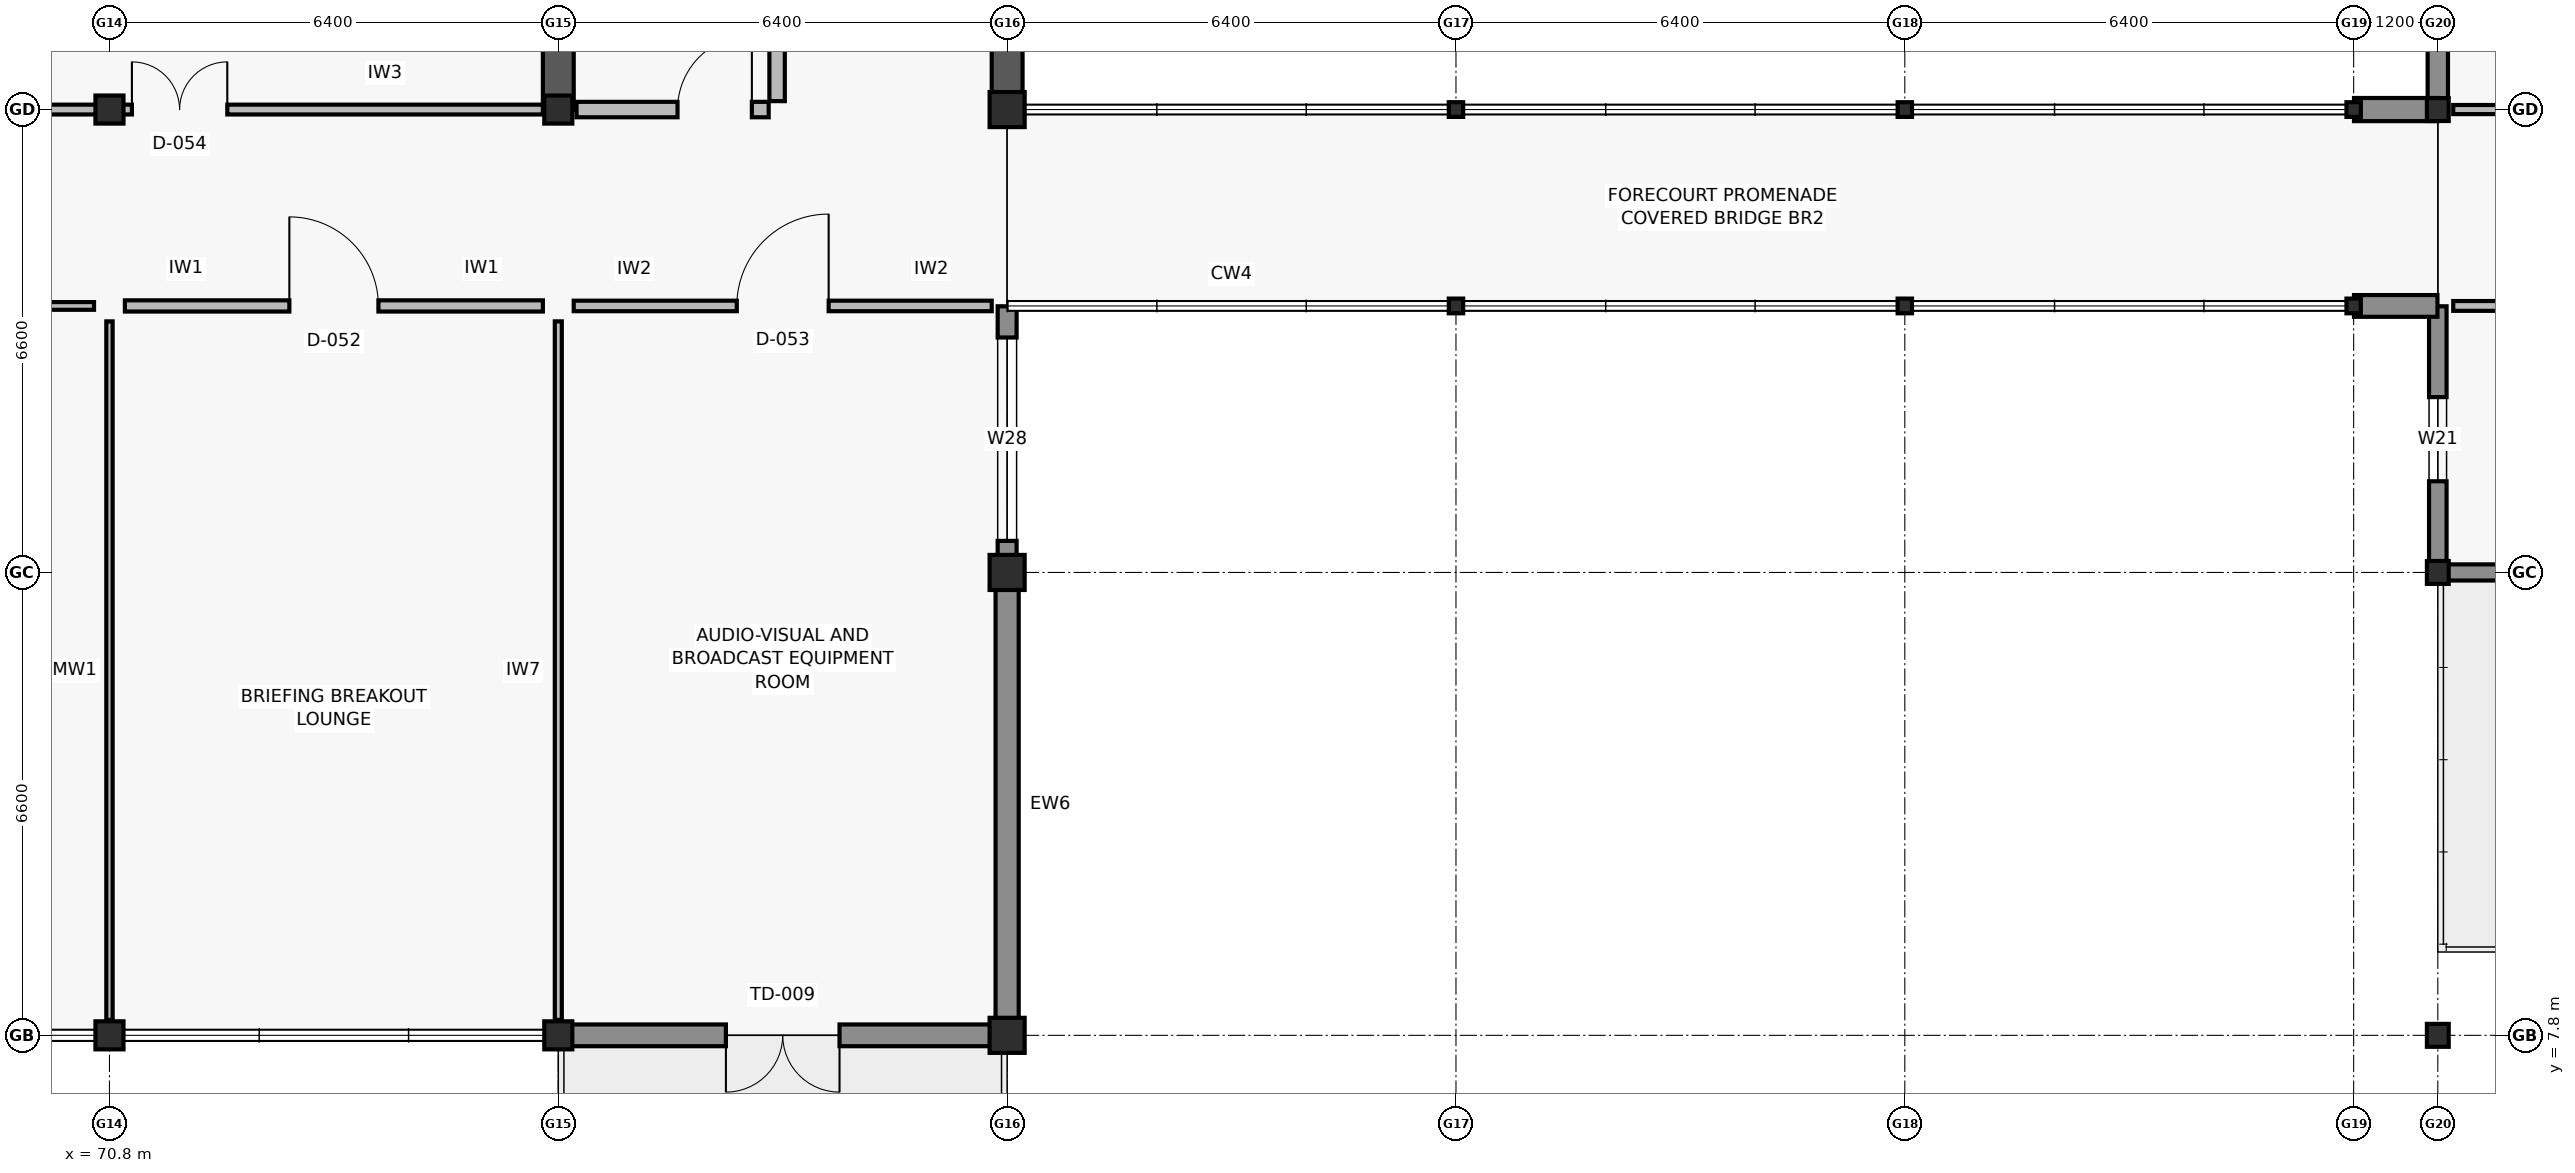
"""IFC4 building model, lengths in metres.
Left out: names, types, materials, properties, quantities, classifications, styles, units other than length and angle.
Written with IfcOpenShell. Run it as: python <this file> out.ifc"""

import sys

from ifc_helpers import new_model, si_unit, direction, frame, frame_2d, origin, origin_2d, place, context, subcontext, project, spatial, rectangle, i_section, extrude, element, fill, save


model = new_model("IFC4")
c1 = context("Model", 3, precision=1e-05, world=origin(), true_north=direction((0.0, 1.0)))
c2 = subcontext(c1, "Body", "Model", "MODEL_VIEW")
j1 = project(units=[si_unit("LENGTHUNIT", "METRE"), si_unit("PLANEANGLEUNIT", "RADIAN")], contexts=[c1])
p1 = place(None, origin())
s1 = spatial("IfcSite", under=j1, at=p1, CompositionType="ELEMENT")
p2 = place(p1, origin())
s2 = spatial("IfcBuilding", under=s1, at=p2, CompositionType="ELEMENT")
p3 = place(p2, frame((0.0, 0.0, 5.4)))
s3 = spatial("IfcBuildingStorey", under=s2, at=p3, CompositionType="ELEMENT", Elevation=5.4)
for number, where, z_axis, x_axis in (
    (1, (70.8, 7.8, 0.0), (0.0, 0.0, 1.0), (1.0, 0.0, 0.0)),
    (2, (70.8, 21.0, 0.0), (0.0, 0.0, 1.0), (1.0, 0.0, 0.0)),
    (3, (77.2, 7.8, 0.0), (0.0, 0.0, 1.0), (1.0, 0.0, 0.0)),
    (4, (77.2, 21.0, 0.0), (0.0, 0.0, 1.0), (1.0, 0.0, 0.0)),
):
    element("IfcColumn", number, at=place(p3, frame(where, z_axis=z_axis, x_axis=x_axis)), inside=s3, PredefinedType="COLUMN", context=c2, shape_type="SweptSolid", body=[
        extrude(i_section(OverallWidth=0.4, OverallDepth=0.4, WebThickness=0.02, FlangeThickness=0.032, at=origin_2d()), origin(), (0.0, 0.0, 1.0), 4.2),
    ])
for number, where, z_axis, x_axis in (
    (5, (83.6, 7.8, 0.0), (0.0, 0.0, 1.0), (1.0, 0.0, 0.0)),
    (6, (83.6, 14.4, 0.0), (0.0, 0.0, 1.0), (1.0, 0.0, 0.0)),
    (7, (83.6, 21.0, 0.0), (0.0, 0.0, 1.0), (1.0, 0.0, 0.0)),
):
    element("IfcColumn", number, at=place(p3, frame(where, z_axis=z_axis, x_axis=x_axis)), inside=s3, PredefinedType="COLUMN", context=c2, shape_type="SweptSolid", body=[
        extrude(i_section(OverallWidth=0.5, OverallDepth=0.5, WebThickness=0.02, FlangeThickness=0.036, at=origin_2d()), origin(), (0.0, 0.0, 1.0), 4.2),
    ])
for number, where, z_axis, x_axis in (
    (8, (90.0, 18.2, 0.0), (0.0, 0.0, 1.0), (1.0, 0.0, 0.0)),
    (9, (90.0, 21.0, 0.0), (0.0, 0.0, 1.0), (1.0, 0.0, 0.0)),
    (10, (96.4, 18.2, 0.0), (0.0, 0.0, 1.0), (1.0, 0.0, 0.0)),
    (11, (96.4, 21.0, 0.0), (0.0, 0.0, 1.0), (1.0, 0.0, 0.0)),
    (12, (102.8, 18.2, 0.0), (0.0, 0.0, 1.0), (1.0, 0.0, 0.0)),
    (13, (102.8, 21.0, 0.0), (0.0, 0.0, 1.0), (1.0, 0.0, 0.0)),
):
    element("IfcColumn", number, at=place(p3, frame(where, z_axis=z_axis, x_axis=x_axis)), inside=s3, PredefinedType="COLUMN", context=c2, shape_type="SweptSolid", body=[
        extrude(i_section(OverallWidth=0.205, OverallDepth=0.21, WebThickness=0.009, FlangeThickness=0.014, FilletRadius=0.011, at=origin_2d()), origin(), (0.0, 0.0, 1.0), 4.2),
    ])
for number, where, z_axis, x_axis in (
    (14, (104.0, 7.8, 0.0), (0.0, 0.0, 1.0), (1.0, 0.0, 0.0)),
    (15, (104.0, 14.4, 0.0), (0.0, 0.0, 1.0), (1.0, 0.0, 0.0)),
    (16, (104.0, 21.0, 0.0), (0.0, 0.0, 1.0), (1.0, 0.0, 0.0)),
):
    element("IfcColumn", number, at=place(p3, frame(where, z_axis=z_axis, x_axis=x_axis)), inside=s3, PredefinedType="COLUMN", context=c2, shape_type="SweptSolid", body=[
        extrude(i_section(OverallWidth=0.311, OverallDepth=0.327, WebThickness=0.016, FlangeThickness=0.025, FilletRadius=0.017, at=origin_2d()), origin(), (0.0, 0.0, 1.0), 4.2),
    ])
for number, where, z_axis, x_axis in (
    (17, (77.2, 21.0, 0.0), (0.0, 0.0, 1.0), (0.0, 1.0, 0.0)),
    (18, (83.6, 21.0, 0.0), (0.0, 0.0, 1.0), (0.0, 1.0, 0.0)),
):
    element("IfcWall", number, at=place(p3, frame(where, z_axis=z_axis, x_axis=x_axis)), inside=s3, PredefinedType="SHEAR", context=c2, shape_type="SweptSolid", body=[
        extrude(rectangle(XDim=6.38, YDim=0.44, at=frame_2d((3.19, 0.0))), origin(), (0.0, 0.0, 1.0), 3.96),
    ])
p4 = place(p3, frame((83.595, 7.8, 0.0), z_axis=(0.0, 0.0, 1.0), x_axis=(-1.0, 0.0, 0.0)))
e19 = element("IfcWall", 19, at=p4, inside=s3, PredefinedType="SOLIDWALL", context=c2, shape_type="SweptSolid", body=[
    extrude(rectangle(XDim=6.39, YDim=0.31, at=frame_2d((3.195, 0.0))), origin(), (0.0, 0.0, 1.0), 3.32),
])
p5 = place(p4, frame((2.385, 0.0, 0.0)))
e20 = element("IfcOpeningElement", 20, at=p5, cuts=e19, PredefinedType="OPENING", context=c2, shape_type="SweptSolid", body=[
    extrude(rectangle(XDim=1.62, YDim=2.18, at=frame_2d((0.81, 1.09))), frame((0.0, 0.165, 0.0), z_axis=(0.0, -1.0, 0.0), x_axis=(1.0, 0.0, 0.0)), (0.0, 0.0, 1.0), 0.33),
])
p6 = place(p3, frame((83.6, 14.395, 0.0), z_axis=(0.0, 0.0, 1.0), x_axis=(0.0, -1.0, 0.0)))
e21 = element("IfcWall", 21, at=p6, inside=s3, PredefinedType="SOLIDWALL", context=c2, shape_type="SweptSolid", body=[
    extrude(rectangle(XDim=6.59, YDim=0.33, at=frame_2d((3.295, 0.0))), origin(), (0.0, 0.0, 1.0), 3.32),
])
p7 = place(p3, frame((83.6, 18.195, 0.0), z_axis=(0.0, 0.0, 1.0), x_axis=(0.0, -1.0, 0.0)))
e22 = element("IfcWall", 22, at=p7, inside=s3, PredefinedType="SOLIDWALL", context=c2, shape_type="SweptSolid", body=[
    extrude(rectangle(XDim=3.79, YDim=0.27, at=frame_2d((1.895, 0.0))), origin(), (0.0, 0.0, 1.0), 3.32),
])
p8 = place(p7, frame((0.445, 0.0, 0.72)))
e23 = element("IfcOpeningElement", 23, at=p8, cuts=e22, PredefinedType="OPENING", context=c2, shape_type="SweptSolid", body=[
    extrude(rectangle(XDim=2.9, YDim=1.15, at=frame_2d((1.45, 0.575))), frame((0.0, 0.145, 0.0), z_axis=(0.0, -1.0, 0.0), x_axis=(1.0, 0.0, 0.0)), (0.0, 0.0, 1.0), 0.29),
])
p9 = place(p3, frame((110.495, 14.4, 0.0), z_axis=(0.0, 0.0, 1.0), x_axis=(-1.0, 0.0, 0.0)))
e24 = element("IfcWall", 24, at=p9, inside=s3, PredefinedType="SOLIDWALL", context=c2, shape_type="SweptSolid", body=[
    extrude(rectangle(XDim=6.49, YDim=0.23, at=frame_2d((3.245, 0.0))), origin(), (0.0, 0.0, 1.0), 3.32),
])
p10 = place(p9, frame((2.675, 0.0, 0.0)))
e25 = element("IfcOpeningElement", 25, at=p10, cuts=e24, PredefinedType="OPENING", context=c2, shape_type="SweptSolid", body=[
    extrude(rectangle(XDim=1.14, YDim=2.14, at=frame_2d((0.57, 1.07))), frame((0.0, 0.125, 0.0), z_axis=(0.0, -1.0, 0.0), x_axis=(1.0, 0.0, 0.0)), (0.0, 0.0, 1.0), 0.25),
])
p11 = place(p3, frame((104.0, 14.405, 0.0), z_axis=(0.0, 0.0, 1.0), x_axis=(0.0, 1.0, 0.0)))
e26 = element("IfcWall", 26, at=p11, inside=s3, PredefinedType="SOLIDWALL", context=c2, shape_type="SweptSolid", body=[
    extrude(rectangle(XDim=3.79, YDim=0.25, at=frame_2d((1.895, 0.0))), origin(), (0.0, 0.0, 1.0), 3.32),
])
p12 = place(p11, frame((1.295, 0.0, 0.8)))
e27 = element("IfcOpeningElement", 27, at=p12, cuts=e26, PredefinedType="OPENING", context=c2, shape_type="SweptSolid", body=[
    extrude(rectangle(XDim=1.2, YDim=2.05, at=frame_2d((0.6, 1.025))), frame((0.0, 0.135, 0.0), z_axis=(0.0, -1.0, 0.0), x_axis=(1.0, 0.0, 0.0)), (0.0, 0.0, 1.0), 0.27),
])
p13 = place(p3, frame((104.0, 21.005, 0.0), z_axis=(0.0, 0.0, 1.0), x_axis=(0.0, 1.0, 0.0)))
e28 = element("IfcWall", 28, at=p13, inside=s3, PredefinedType="SOLIDWALL", context=c2, shape_type="SweptSolid", body=[
    extrude(rectangle(XDim=6.59, YDim=0.29, at=frame_2d((3.295, 0.0))), origin(), (0.0, 0.0, 1.0), 3.32),
])
p14 = place(p13, frame((2.545, 0.0, 0.8)))
e29 = element("IfcOpeningElement", 29, at=p14, cuts=e28, PredefinedType="OPENING", context=c2, shape_type="SweptSolid", body=[
    extrude(rectangle(XDim=1.5, YDim=2.05, at=frame_2d((0.75, 1.025))), frame((0.0, 0.155, 0.0), z_axis=(0.0, -1.0, 0.0), x_axis=(1.0, 0.0, 0.0)), (0.0, 0.0, 1.0), 0.31),
])
p15 = place(p3, frame((103.995, 18.2, 0.0), z_axis=(0.0, 0.0, 1.0), x_axis=(-1.0, 0.0, 0.0)))
e30 = element("IfcWall", 30, at=p15, inside=s3, PredefinedType="SOLIDWALL", context=c2, shape_type="SweptSolid", body=[
    extrude(rectangle(XDim=1.19, YDim=0.31, at=frame_2d((0.595, 0.0))), origin(), (0.0, 0.0, 1.0), 3.32),
])
p16 = place(p3, frame((102.805, 21.0, 0.0), z_axis=(0.0, 0.0, 1.0), x_axis=(1.0, 0.0, 0.0)))
e31 = element("IfcWall", 31, at=p16, inside=s3, PredefinedType="SOLIDWALL", context=c2, shape_type="SweptSolid", body=[
    extrude(rectangle(XDim=1.19, YDim=0.33, at=frame_2d((0.595, 0.0))), origin(), (0.0, 0.0, 1.0), 3.32),
])
p17 = place(p3, frame((80.32, 21.12, 0.0), z_axis=(0.0, 0.0, 1.0), x_axis=(0.0, 1.0, 0.0)))
e32 = element("IfcWall", 32, at=p17, inside=s3, PredefinedType="SOLIDWALL", context=c2, shape_type="SweptSolid", body=[
    extrude(rectangle(XDim=6.255, YDim=0.22, at=frame_2d((3.127, 0.0))), origin(), (0.0, 0.0, 1.0), 3.96),
])
p18 = place(p3, frame((77.46, 21.0, 0.0), z_axis=(0.0, 0.0, 1.0), x_axis=(1.0, 0.0, 0.0)))
e33 = element("IfcWall", 33, at=p18, inside=s3, PredefinedType="SOLIDWALL", context=c2, shape_type="SweptSolid", body=[
    extrude(rectangle(XDim=2.74, YDim=0.22, at=frame_2d((1.37, 0.0))), origin(), (0.0, 0.0, 1.0), 3.32),
])
p19 = place(p18, frame((1.44, 0.0, 0.0)))
e34 = element("IfcOpeningElement", 34, at=p19, cuts=e33, PredefinedType="OPENING", context=c2, shape_type="SweptSolid", body=[
    extrude(rectangle(XDim=1.06, YDim=2.1, at=frame_2d((0.53, 1.05))), frame((0.0, 0.12, 0.0), z_axis=(0.0, -1.0, 0.0), x_axis=(1.0, 0.0, 0.0)), (0.0, 0.0, 1.0), 0.24),
])
p20 = place(p3, frame((70.8, 8.02, 0.0), z_axis=(0.0, 0.0, 1.0), x_axis=(0.0, 1.0, 0.0)))
e35 = element("IfcWall", 35, at=p20, inside=s3, PredefinedType="MOVABLE", context=c2, shape_type="SweptSolid", body=[
    extrude(rectangle(XDim=9.96, YDim=0.09, at=frame_2d((4.98, 0.0))), origin(), (0.0, 0.0, 1.0), 3.3),
])
p21 = place(p3, frame((64.62, 18.2, 0.0), z_axis=(0.0, 0.0, 1.0), x_axis=(1.0, 0.0, 0.0)))
e36 = element("IfcWall", 36, at=p21, inside=s3, PredefinedType="PARTITIONING", context=c2, shape_type="SweptSolid", body=[
    extrude(rectangle(XDim=5.96, YDim=0.11, at=frame_2d((2.98, 0.0))), origin(), (0.0, 0.0, 1.0), 3.3),
])
p22 = place(p21, frame((2.365, 0.0, 0.0)))
e37 = element("IfcOpeningElement", 37, at=p22, cuts=e36, PredefinedType="OPENING", context=c2, shape_type="SweptSolid", body=[
    extrude(rectangle(XDim=1.23, YDim=2.08, at=frame_2d((0.615, 1.04))), frame((0.0, 0.065, 0.0), z_axis=(0.0, -1.0, 0.0), x_axis=(1.0, 0.0, 0.0)), (0.0, 0.0, 1.0), 0.13),
])
p23 = place(p3, frame((77.2, 8.02, 0.0), z_axis=(0.0, 0.0, 1.0), x_axis=(0.0, 1.0, 0.0)))
e38 = element("IfcWall", 38, at=p23, inside=s3, PredefinedType="PARTITIONING", context=c2, shape_type="SweptSolid", body=[
    extrude(rectangle(XDim=9.96, YDim=0.1, at=frame_2d((4.98, 0.0))), origin(), (0.0, 0.0, 1.0), 3.3),
])
p24 = place(p3, frame((71.02, 18.2, 0.0), z_axis=(0.0, 0.0, 1.0), x_axis=(1.0, 0.0, 0.0)))
e39 = element("IfcWall", 39, at=p24, inside=s3, PredefinedType="PARTITIONING", context=c2, shape_type="SweptSolid", body=[
    extrude(rectangle(XDim=5.96, YDim=0.16, at=frame_2d((2.98, 0.0))), origin(), (0.0, 0.0, 1.0), 3.3),
])
p25 = place(p24, frame((2.345, 0.0, 0.0)))
e40 = element("IfcOpeningElement", 40, at=p25, cuts=e39, PredefinedType="OPENING", context=c2, shape_type="SweptSolid", body=[
    extrude(rectangle(XDim=1.27, YDim=2.1, at=frame_2d((0.635, 1.05))), frame((0.0, 0.09, 0.0), z_axis=(0.0, -1.0, 0.0), x_axis=(1.0, 0.0, 0.0)), (0.0, 0.0, 1.0), 0.18),
])
p26 = place(p3, frame((77.42, 18.2, 0.0), z_axis=(0.0, 0.0, 1.0), x_axis=(1.0, 0.0, 0.0)))
e41 = element("IfcWall", 41, at=p26, inside=s3, PredefinedType="PARTITIONING", context=c2, shape_type="SweptSolid", body=[
    extrude(rectangle(XDim=5.96, YDim=0.15, at=frame_2d((2.98, 0.0))), origin(), (0.0, 0.0, 1.0), 3.3),
])
p27 = place(p26, frame((2.325, 0.0, 0.0)))
e42 = element("IfcOpeningElement", 42, at=p27, cuts=e41, PredefinedType="OPENING", context=c2, shape_type="SweptSolid", body=[
    extrude(rectangle(XDim=1.31, YDim=2.14, at=frame_2d((0.655, 1.07))), frame((0.0, 0.085, 0.0), z_axis=(0.0, -1.0, 0.0), x_axis=(1.0, 0.0, 0.0)), (0.0, 0.0, 1.0), 0.17),
])
p28 = place(p3, frame((64.62, 21.0, 0.0), z_axis=(0.0, 0.0, 1.0), x_axis=(1.0, 0.0, 0.0)))
e43 = element("IfcWall", 43, at=p28, inside=s3, PredefinedType="PARTITIONING", context=c2, shape_type="SweptSolid", body=[
    extrude(rectangle(XDim=12.36, YDim=0.14, at=frame_2d((6.18, 0.0))), origin(), (0.0, 0.0, 1.0), 3.3),
])
p29 = place(p28, frame((6.5, 0.0, 0.0)))
e44 = element("IfcOpeningElement", 44, at=p29, cuts=e43, PredefinedType="OPENING", context=c2, shape_type="SweptSolid", body=[
    extrude(rectangle(XDim=1.36, YDim=2.15, at=frame_2d((0.68, 1.075))), frame((0.0, 0.08, 0.0), z_axis=(0.0, -1.0, 0.0), x_axis=(1.0, 0.0, 0.0)), (0.0, 0.0, 1.0), 0.16),
])
p30 = place(p3, frame((104.22, 18.2, 0.0), z_axis=(0.0, 0.0, 1.0), x_axis=(1.0, 0.0, 0.0)))
e45 = element("IfcWall", 45, at=p30, inside=s3, PredefinedType="PARTITIONING", context=c2, shape_type="SweptSolid", body=[
    extrude(rectangle(XDim=6.06, YDim=0.14, at=frame_2d((3.03, 0.0))), origin(), (0.0, 0.0, 1.0), 3.3),
])
p31 = place(p30, frame((2.21, 0.0, 0.0)))
e46 = element("IfcOpeningElement", 46, at=p31, cuts=e45, PredefinedType="OPENING", context=c2, shape_type="SweptSolid", body=[
    extrude(rectangle(XDim=1.64, YDim=2.2, at=frame_2d((0.82, 1.1))), frame((0.0, 0.08, 0.0), z_axis=(0.0, -1.0, 0.0), x_axis=(1.0, 0.0, 0.0)), (0.0, 0.0, 1.0), 0.16),
])
p32 = place(p3, frame((104.22, 21.0, 0.0), z_axis=(0.0, 0.0, 1.0), x_axis=(1.0, 0.0, 0.0)))
e47 = element("IfcWall", 47, at=p32, inside=s3, PredefinedType="PARTITIONING", context=c2, shape_type="SweptSolid", body=[
    extrude(rectangle(XDim=6.06, YDim=0.13, at=frame_2d((3.03, 0.0))), origin(), (0.0, 0.0, 1.0), 3.3),
])
p33 = place(p32, frame((2.16, 0.0, 0.0)))
e48 = element("IfcOpeningElement", 48, at=p33, cuts=e47, PredefinedType="OPENING", context=c2, shape_type="SweptSolid", body=[
    extrude(rectangle(XDim=1.74, YDim=2.2, at=frame_2d((0.87, 1.1))), frame((0.0, 0.075, 0.0), z_axis=(0.0, -1.0, 0.0), x_axis=(1.0, 0.0, 0.0)), (0.0, 0.0, 1.0), 0.15),
])
p34 = place(p5, origin())
e49 = element("IfcDoor", 49, at=p34, inside=s3, OperationType="DOUBLE_DOOR_SINGLE_SWING", PredefinedType="DOOR", context=c2, shape_type="SweptSolid", body=[
    extrude(rectangle(XDim=1.62, YDim=2.18, at=frame_2d((0.81, 1.09))), frame((0.0, 0.025, 0.0), z_axis=(0.0, -1.0, 0.0), x_axis=(1.0, 0.0, 0.0)), (0.0, 0.0, 1.0), 0.05),
])
fill(e20, e49)
p35 = place(p8, origin())
e50 = element("IfcWindow", 50, at=p35, inside=s3, PartitioningType="TRIPLE_PANEL_VERTICAL", PredefinedType="WINDOW", context=c2, shape_type="SweptSolid", body=[
    extrude(rectangle(XDim=2.9, YDim=1.15, at=frame_2d((1.45, 0.575))), frame((0.0, 0.03, 0.0), z_axis=(0.0, -1.0, 0.0), x_axis=(1.0, 0.0, 0.0)), (0.0, 0.0, 1.0), 0.06),
])
fill(e23, e50)
p36 = place(p12, origin())
e51 = element("IfcWindow", 51, at=p36, inside=s3, PartitioningType="SINGLE_PANEL", PredefinedType="WINDOW", context=c2, shape_type="SweptSolid", body=[
    extrude(rectangle(XDim=1.2, YDim=2.05, at=frame_2d((0.6, 1.025))), frame((0.0, 0.03, 0.0), z_axis=(0.0, -1.0, 0.0), x_axis=(1.0, 0.0, 0.0)), (0.0, 0.0, 1.0), 0.06),
])
fill(e27, e51)
p37 = place(p19, origin())
e52 = element("IfcDoor", 52, at=p37, inside=s3, OperationType="SINGLE_SWING_RIGHT", PredefinedType="DOOR", context=c2, shape_type="SweptSolid", body=[
    extrude(rectangle(XDim=1.06, YDim=2.1, at=frame_2d((0.53, 1.05))), frame((0.0, 0.025, 0.0), z_axis=(0.0, -1.0, 0.0), x_axis=(1.0, 0.0, 0.0)), (0.0, 0.0, 1.0), 0.05),
])
fill(e34, e52)
p38 = place(p25, origin())
e53 = element("IfcDoor", 53, at=p38, inside=s3, OperationType="SINGLE_SWING_LEFT", PredefinedType="DOOR", context=c2, shape_type="SweptSolid", body=[
    extrude(rectangle(XDim=1.27, YDim=2.1, at=frame_2d((0.635, 1.05))), frame((0.0, 0.025, 0.0), z_axis=(0.0, -1.0, 0.0), x_axis=(1.0, 0.0, 0.0)), (0.0, 0.0, 1.0), 0.05),
])
fill(e40, e53)
p39 = place(p27, origin())
e54 = element("IfcDoor", 54, at=p39, inside=s3, OperationType="SINGLE_SWING_RIGHT", PredefinedType="DOOR", context=c2, shape_type="SweptSolid", body=[
    extrude(rectangle(XDim=1.31, YDim=2.14, at=frame_2d((0.655, 1.07))), frame((0.0, 0.025, 0.0), z_axis=(0.0, -1.0, 0.0), x_axis=(1.0, 0.0, 0.0)), (0.0, 0.0, 1.0), 0.05),
])
fill(e42, e54)
p40 = place(p29, origin())
e55 = element("IfcDoor", 55, at=p40, inside=s3, OperationType="DOUBLE_DOOR_SINGLE_SWING", PredefinedType="DOOR", context=c2, shape_type="SweptSolid", body=[
    extrude(rectangle(XDim=1.36, YDim=2.15, at=frame_2d((0.68, 1.075))), frame((0.0, 0.025, 0.0), z_axis=(0.0, -1.0, 0.0), x_axis=(1.0, 0.0, 0.0)), (0.0, 0.0, 1.0), 0.05),
])
fill(e44, e55)
save(model, sys.argv[1])
